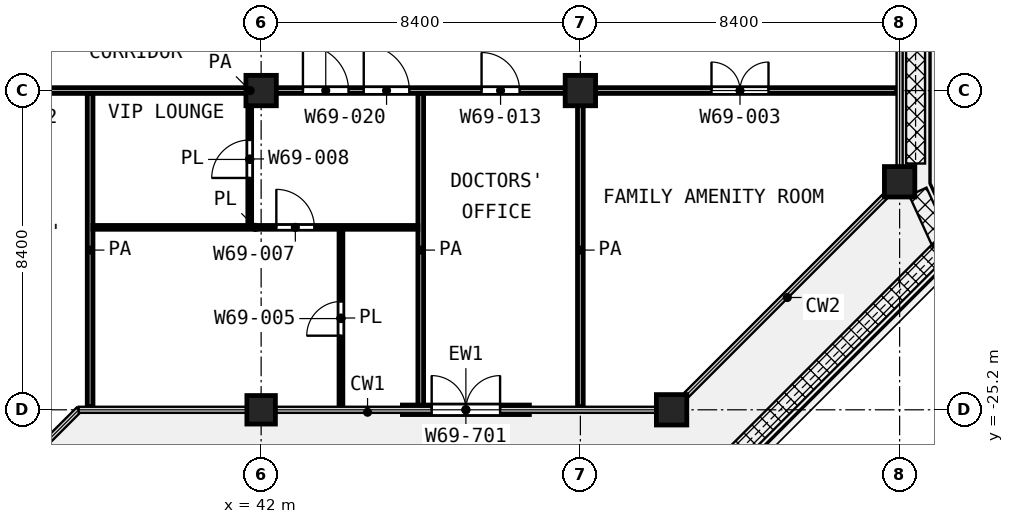
"""IFC4 building model, lengths in metres.
Left out: names, types, materials, properties, quantities, classifications, styles, units other than length and angle.
Written with IfcOpenShell. Run it as: python <this file> out.ifc"""

import sys

from ifc_helpers import new_model, si_unit, direction, frame, frame_2d, origin, origin_2d, place, context, subcontext, project, spatial, rectangle, extrude, element, fill, save


model = new_model("IFC4")
c1 = context("Model", 3, precision=1e-05, world=origin(), true_north=direction((0.0, 1.0)))
c2 = subcontext(c1, "Body", "Model", "MODEL_VIEW")
j1 = project(units=[si_unit("LENGTHUNIT", "METRE"), si_unit("PLANEANGLEUNIT", "RADIAN")], contexts=[c1])
p1 = place(None, origin())
s1 = spatial("IfcSite", under=j1, at=p1, CompositionType="ELEMENT")
p2 = place(p1, origin())
s2 = spatial("IfcBuilding", under=s1, at=p2, CompositionType="ELEMENT")
p3 = place(p2, frame((0.0, 0.0, 319.6)))
s3 = spatial("IfcBuildingStorey", under=s2, at=p3, CompositionType="ELEMENT", Elevation=319.6)
for number, where, z_axis, x_axis in (
    (1, (42.0, -16.8, 0.0), (0.0, 0.0, 1.0), (1.0, 0.0, 0.0)),
    (2, (50.4, -16.8, 0.0), (0.0, 0.0, 1.0), (1.0, 0.0, 0.0)),
    (3, (58.8, -19.2, 0.0), (0.0, 0.0, 1.0), (1.0, 0.0, 0.0)),
):
    element("IfcColumn", number, at=place(p3, frame(where, z_axis=z_axis, x_axis=x_axis)), inside=s3, PredefinedType="COLUMN", context=c2, shape_type="SweptSolid", body=[
        extrude(rectangle(XDim=0.8, YDim=0.8, at=origin_2d()), origin(), (0.0, 0.0, 1.0), 4.2),
    ])
p4 = place(p3, frame((42.0, -25.2, 0.0), z_axis=(0.0, 0.0, 1.0), x_axis=(1.0, 0.0, 0.0)))
e4 = element("IfcColumn", 4, at=p4, inside=s3, PredefinedType="COLUMN", context=c2, shape_type="SweptSolid", body=[
    extrude(rectangle(XDim=0.75, YDim=0.75, at=origin_2d()), origin(), (0.0, 0.0, 1.0), 4.2),
])
p5 = place(p3, frame((52.8, -25.2, 0.0), z_axis=(0.0, 0.0, 1.0), x_axis=(1.0, 0.0, 0.0)))
e5 = element("IfcColumn", 5, at=p5, inside=s3, PredefinedType="COLUMN", context=c2, shape_type="SweptSolid", body=[
    extrude(rectangle(XDim=0.8, YDim=0.8, at=origin_2d()), origin(), (0.0, 0.0, 1.0), 4.2),
])
p6 = place(p3, frame((45.717, -25.2, 0.0), z_axis=(0.0, 0.0, 1.0), x_axis=(1.0, 0.0, 0.0)))
e6 = element("IfcWall", 6, at=p6, inside=s3, PredefinedType="SOLIDWALL", context=c2, shape_type="SweptSolid", body=[
    extrude(rectangle(XDim=3.342, YDim=0.25, at=frame_2d((1.671, 0.0))), origin(), (0.0, 0.0, 1.0), 3.48),
])
p7 = place(p6, frame((0.771, 0.0, 0.0)))
e7 = element("IfcOpeningElement", 7, at=p7, cuts=e6, PredefinedType="OPENING", context=c2, shape_type="SweptSolid", body=[
    extrude(rectangle(XDim=1.8, YDim=2.1, at=frame_2d((0.9, 1.05))), frame((0.0, 0.135, 0.0), z_axis=(0.0, -1.0, 0.0), x_axis=(1.0, 0.0, 0.0)), (0.0, 0.0, 1.0), 0.27),
])
p8 = place(p3, frame((37.575, -20.4, 0.0), z_axis=(0.0, 0.0, 1.0), x_axis=(1.0, 0.0, 0.0)))
e8 = element("IfcWall", 8, at=p8, inside=s3, PredefinedType="PARTITIONING", context=c2, shape_type="SweptSolid", body=[
    extrude(rectangle(XDim=8.55, YDim=0.1, at=frame_2d((4.275, 0.0))), origin(), (0.0, 0.0, 1.0), 3.6),
])
p9 = place(p8, frame((4.825, 0.0, 0.0)))
e9 = element("IfcOpeningElement", 9, at=p9, cuts=e8, PredefinedType="OPENING", context=c2, shape_type="SweptSolid", body=[
    extrude(rectangle(XDim=1.0, YDim=2.1, at=frame_2d((0.5, 1.05))), frame((0.0, 0.06, 0.0), z_axis=(0.0, -1.0, 0.0), x_axis=(1.0, 0.0, 0.0)), (0.0, 0.0, 1.0), 0.12),
])
p10 = place(p3, frame((41.7, -20.35, 0.0), z_axis=(0.0, 0.0, 1.0), x_axis=(0.0, 1.0, 0.0)))
e10 = element("IfcWall", 10, at=p10, inside=s3, PredefinedType="PARTITIONING", context=c2, shape_type="SweptSolid", body=[
    extrude(rectangle(XDim=3.475, YDim=0.1, at=frame_2d((1.738, 0.0))), origin(), (0.0, 0.0, 1.0), 3.6),
])
p11 = place(p10, frame((1.25, 0.0, 0.0)))
e11 = element("IfcOpeningElement", 11, at=p11, cuts=e10, PredefinedType="OPENING", context=c2, shape_type="SweptSolid", body=[
    extrude(rectangle(XDim=1.0, YDim=2.1, at=frame_2d((0.5, 1.05))), frame((0.0, 0.06, 0.0), z_axis=(0.0, -1.0, 0.0), x_axis=(1.0, 0.0, 0.0)), (0.0, 0.0, 1.0), 0.12),
])
p12 = place(p3, frame((44.1, -25.12, 0.0), z_axis=(0.0, 0.0, 1.0), x_axis=(0.0, 1.0, 0.0)))
e12 = element("IfcWall", 12, at=p12, inside=s3, PredefinedType="PARTITIONING", context=c2, shape_type="SweptSolid", body=[
    extrude(rectangle(XDim=4.67, YDim=0.1, at=frame_2d((2.335, 0.0))), origin(), (0.0, 0.0, 1.0), 3.6),
])
p13 = place(p12, frame((1.87, 0.0, 0.0)))
e13 = element("IfcOpeningElement", 13, at=p13, cuts=e12, PredefinedType="OPENING", context=c2, shape_type="SweptSolid", body=[
    extrude(rectangle(XDim=0.9, YDim=2.1, at=frame_2d((0.45, 1.05))), frame((0.0, 0.06, 0.0), z_axis=(0.0, -1.0, 0.0), x_axis=(1.0, 0.0, 0.0)), (0.0, 0.0, 1.0), 0.12),
])
p14 = place(p3, frame((24.7, -16.8, 0.0), z_axis=(0.0, 0.0, 1.0), x_axis=(1.0, 0.0, 0.0)))
e14 = element("IfcWall", 14, at=p14, inside=s3, PredefinedType="PARTITIONING", context=c2, shape_type="SweptSolid", body=[
    extrude(rectangle(XDim=34.02, YDim=0.15, at=frame_2d((17.01, 0.0))), origin(), (0.0, 0.0, 1.0), 3.6),
])
p15 = place(p14, frame((1.85, 0.0, 0.0)))
e15 = element("IfcOpeningElement", 15, at=p15, cuts=e14, PredefinedType="OPENING", context=c2, shape_type="SweptSolid", body=[
    extrude(rectangle(XDim=1.5, YDim=2.1, at=frame_2d((0.75, 1.05))), frame((0.0, 0.085, 0.0), z_axis=(0.0, -1.0, 0.0), x_axis=(1.0, 0.0, 0.0)), (0.0, 0.0, 1.0), 0.17),
])
p16 = place(p14, frame((6.2, 0.0, 0.0)))
e16 = element("IfcOpeningElement", 16, at=p16, cuts=e14, PredefinedType="OPENING", context=c2, shape_type="SweptSolid", body=[
    extrude(rectangle(XDim=1.2, YDim=2.1, at=frame_2d((0.6, 1.05))), frame((0.0, 0.085, 0.0), z_axis=(0.0, -1.0, 0.0), x_axis=(1.0, 0.0, 0.0)), (0.0, 0.0, 1.0), 0.17),
])
p17 = place(p14, frame((10.35, 0.0, 0.0)))
e17 = element("IfcOpeningElement", 17, at=p17, cuts=e14, PredefinedType="OPENING", context=c2, shape_type="SweptSolid", body=[
    extrude(rectangle(XDim=1.0, YDim=2.1, at=frame_2d((0.5, 1.05))), frame((0.0, 0.085, 0.0), z_axis=(0.0, -1.0, 0.0), x_axis=(1.0, 0.0, 0.0)), (0.0, 0.0, 1.0), 0.17),
])
p18 = place(p14, frame((20.0, 0.0, 0.0)))
e18 = element("IfcOpeningElement", 18, at=p18, cuts=e14, PredefinedType="OPENING", context=c2, shape_type="SweptSolid", body=[
    extrude(rectangle(XDim=1.2, YDim=2.1, at=frame_2d((0.6, 1.05))), frame((0.0, 0.085, 0.0), z_axis=(0.0, -1.0, 0.0), x_axis=(1.0, 0.0, 0.0)), (0.0, 0.0, 1.0), 0.17),
])
p19 = place(p14, frame((18.4, 0.0, 0.0)))
e19 = element("IfcOpeningElement", 19, at=p19, cuts=e14, PredefinedType="OPENING", context=c2, shape_type="SweptSolid", body=[
    extrude(rectangle(XDim=1.2, YDim=2.1, at=frame_2d((0.6, 1.05))), frame((0.0, 0.085, 0.0), z_axis=(0.0, -1.0, 0.0), x_axis=(1.0, 0.0, 0.0)), (0.0, 0.0, 1.0), 0.17),
])
p20 = place(p14, frame((23.1, 0.0, 0.0)))
e20 = element("IfcOpeningElement", 20, at=p20, cuts=e14, PredefinedType="OPENING", context=c2, shape_type="SweptSolid", body=[
    extrude(rectangle(XDim=1.0, YDim=2.1, at=frame_2d((0.5, 1.05))), frame((0.0, 0.085, 0.0), z_axis=(0.0, -1.0, 0.0), x_axis=(1.0, 0.0, 0.0)), (0.0, 0.0, 1.0), 0.17),
])
p21 = place(p14, frame((29.15, 0.0, 0.0)))
e21 = element("IfcOpeningElement", 21, at=p21, cuts=e14, PredefinedType="OPENING", context=c2, shape_type="SweptSolid", body=[
    extrude(rectangle(XDim=1.5, YDim=2.1, at=frame_2d((0.75, 1.05))), frame((0.0, 0.085, 0.0), z_axis=(0.0, -1.0, 0.0), x_axis=(1.0, 0.0, 0.0)), (0.0, 0.0, 1.0), 0.17),
])
for number, where, z_axis, x_axis in (
    (22, (37.5, -25.12, 0.0), (0.0, 0.0, 1.0), (0.0, 1.0, 0.0)),
    (23, (46.2, -25.12, 0.0), (0.0, 0.0, 1.0), (0.0, 1.0, 0.0)),
    (24, (50.4, -25.12, 0.0), (0.0, 0.0, 1.0), (0.0, 1.0, 0.0)),
):
    element("IfcWall", number, at=place(p3, frame(where, z_axis=z_axis, x_axis=x_axis)), inside=s3, PredefinedType="PARTITIONING", context=c2, shape_type="SweptSolid", body=[
        extrude(rectangle(XDim=8.245, YDim=0.15, at=frame_2d((4.123, 0.0))), origin(), (0.0, 0.0, 1.0), 3.6),
    ])
p22 = place(p7, origin())
e25 = element("IfcDoor", 25, at=p22, inside=s3, OperationType="DOUBLE_DOOR_SINGLE_SWING", PredefinedType="DOOR", context=c2, shape_type="SweptSolid", body=[
    extrude(rectangle(XDim=1.8, YDim=2.1, at=frame_2d((0.9, 1.05))), frame((0.0, 0.025, 0.0), z_axis=(0.0, -1.0, 0.0), x_axis=(1.0, 0.0, 0.0)), (0.0, 0.0, 1.0), 0.05),
])
fill(e7, e25)
p23 = place(p18, origin())
e26 = element("IfcDoor", 26, at=p23, inside=s3, OperationType="SINGLE_SWING_LEFT", PredefinedType="DOOR", context=c2, shape_type="SweptSolid", body=[
    extrude(rectangle(XDim=1.2, YDim=2.1, at=frame_2d((0.6, 1.05))), frame((0.0, 0.025, 0.0), z_axis=(0.0, -1.0, 0.0), x_axis=(1.0, 0.0, 0.0)), (0.0, 0.0, 1.0), 0.05),
])
fill(e18, e26)
p24 = place(p19, origin())
e27 = element("IfcDoor", 27, at=p24, inside=s3, OperationType="SINGLE_SWING_LEFT", PredefinedType="DOOR", context=c2, shape_type="SweptSolid", body=[
    extrude(rectangle(XDim=1.2, YDim=2.1, at=frame_2d((0.6, 1.05))), frame((0.0, 0.025, 0.0), z_axis=(0.0, -1.0, 0.0), x_axis=(1.0, 0.0, 0.0)), (0.0, 0.0, 1.0), 0.05),
])
fill(e19, e27)
p25 = place(p9, origin())
e28 = element("IfcDoor", 28, at=p25, inside=s3, OperationType="SINGLE_SWING_LEFT", PredefinedType="DOOR", context=c2, shape_type="SweptSolid", body=[
    extrude(rectangle(XDim=1.0, YDim=2.1, at=frame_2d((0.5, 1.05))), frame((0.0, 0.025, 0.0), z_axis=(0.0, -1.0, 0.0), x_axis=(1.0, 0.0, 0.0)), (0.0, 0.0, 1.0), 0.05),
])
fill(e9, e28)
p26 = place(p11, origin())
e29 = element("IfcDoor", 29, at=p26, inside=s3, OperationType="SINGLE_SWING_LEFT", PredefinedType="DOOR", context=c2, shape_type="SweptSolid", body=[
    extrude(rectangle(XDim=1.0, YDim=2.1, at=frame_2d((0.5, 1.05))), frame((0.0, 0.025, 0.0), z_axis=(0.0, -1.0, 0.0), x_axis=(1.0, 0.0, 0.0)), (0.0, 0.0, 1.0), 0.05),
])
fill(e11, e29)
p27 = place(p13, origin())
e30 = element("IfcDoor", 30, at=p27, inside=s3, OperationType="SINGLE_SWING_LEFT", PredefinedType="DOOR", context=c2, shape_type="SweptSolid", body=[
    extrude(rectangle(XDim=0.9, YDim=2.1, at=frame_2d((0.45, 1.05))), frame((0.0, 0.025, 0.0), z_axis=(0.0, -1.0, 0.0), x_axis=(1.0, 0.0, 0.0)), (0.0, 0.0, 1.0), 0.05),
])
fill(e13, e30)
p28 = place(p20, origin())
e31 = element("IfcDoor", 31, at=p28, inside=s3, OperationType="SINGLE_SWING_LEFT", PredefinedType="DOOR", context=c2, shape_type="SweptSolid", body=[
    extrude(rectangle(XDim=1.0, YDim=2.1, at=frame_2d((0.5, 1.05))), frame((0.0, 0.025, 0.0), z_axis=(0.0, -1.0, 0.0), x_axis=(1.0, 0.0, 0.0)), (0.0, 0.0, 1.0), 0.05),
])
fill(e20, e31)
p29 = place(p21, origin())
e32 = element("IfcDoor", 32, at=p29, inside=s3, OperationType="DOUBLE_DOOR_SINGLE_SWING", PredefinedType="DOOR", context=c2, shape_type="SweptSolid", body=[
    extrude(rectangle(XDim=1.5, YDim=2.1, at=frame_2d((0.75, 1.05))), frame((0.0, 0.025, 0.0), z_axis=(0.0, -1.0, 0.0), x_axis=(1.0, 0.0, 0.0)), (0.0, 0.0, 1.0), 0.05),
])
fill(e21, e32)
save(model, sys.argv[1])
